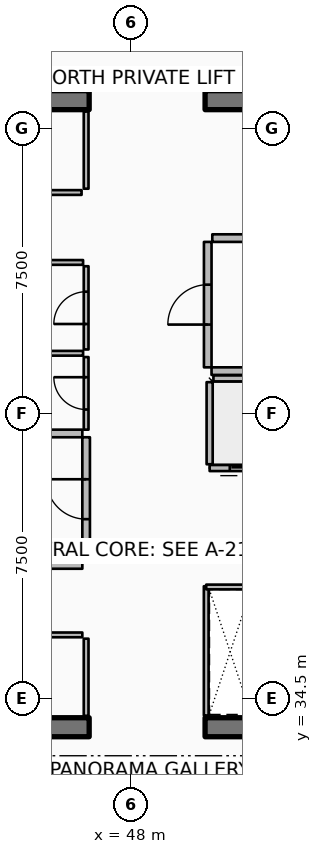
"""IFC4 building model, lengths in metres.
Left out: names, types, materials, properties, quantities, classifications, styles, units other than length and angle.
Written with IfcOpenShell. Run it as: python <this file> out.ifc"""

import sys

from ifc_helpers import new_model, si_unit, direction, frame, frame_2d, origin, place, context, subcontext, project, spatial, rectangle, extrude, element, fill, save


model = new_model("IFC4")
c1 = context("Model", 3, precision=1e-05, world=origin(), true_north=direction((0.0, 1.0)))
c2 = subcontext(c1, "Body", "Model", "MODEL_VIEW")
j1 = project(units=[si_unit("LENGTHUNIT", "METRE"), si_unit("PLANEANGLEUNIT", "RADIAN")], contexts=[c1])
p1 = place(None, origin())
s1 = spatial("IfcSite", under=j1, at=p1, CompositionType="ELEMENT")
p2 = place(p1, origin())
s2 = spatial("IfcBuilding", under=s1, at=p2, CompositionType="ELEMENT")
p3 = place(p2, frame((0.0, 0.0, 347.3)))
s3 = spatial("IfcBuildingStorey", under=s2, at=p3, CompositionType="ELEMENT", Elevation=347.3)
p4 = place(p3, frame((37.3, 33.75, 0.0), z_axis=(0.0, 0.0, 1.0), x_axis=(1.0, 0.0, 0.0)))
e1 = element("IfcWall", 1, at=p4, inside=s3, PredefinedType="SHEAR", context=c2, shape_type="SweptSolid", body=[
    extrude(rectangle(XDim=9.6, YDim=0.5, at=frame_2d((4.8, 0.0))), origin(), (0.0, 0.0, 1.0), 4.2),
])
p5 = place(p3, frame((49.95, 33.75, 0.0), z_axis=(0.0, 0.0, 1.0), x_axis=(1.0, 0.0, 0.0)))
e2 = element("IfcWall", 2, at=p5, inside=s3, PredefinedType="SHEAR", context=c2, shape_type="SweptSolid", body=[
    extrude(rectangle(XDim=9.6, YDim=0.5, at=frame_2d((4.8, 0.0))), origin(), (0.0, 0.0, 1.0), 4.2),
])
p6 = place(p3, frame((37.3, 50.25, 0.0), z_axis=(0.0, 0.0, 1.0), x_axis=(1.0, 0.0, 0.0)))
e3 = element("IfcWall", 3, at=p6, inside=s3, PredefinedType="SHEAR", context=c2, shape_type="SweptSolid", body=[
    extrude(rectangle(XDim=9.6, YDim=0.5, at=frame_2d((4.8, 0.0))), origin(), (0.0, 0.0, 1.0), 4.2),
])
p7 = place(p3, frame((49.95, 50.25, 0.0), z_axis=(0.0, 0.0, 1.0), x_axis=(1.0, 0.0, 0.0)))
e4 = element("IfcWall", 4, at=p7, inside=s3, PredefinedType="SHEAR", context=c2, shape_type="SweptSolid", body=[
    extrude(rectangle(XDim=9.6, YDim=0.5, at=frame_2d((4.8, 0.0))), origin(), (0.0, 0.0, 1.0), 4.2),
])
p8 = place(p3, frame((52.23, 40.57, 0.0), z_axis=(0.0, 0.0, 1.0), x_axis=(-1.0, 0.0, 0.0)))
e5 = element("IfcWall", 5, at=p8, inside=s3, PredefinedType="PARTITIONING", context=c2, shape_type="SweptSolid", body=[
    extrude(rectangle(XDim=2.16, YDim=0.16, at=frame_2d((1.08, 0.0))), origin(), (0.0, 0.0, 1.0), 3.8),
])
p9 = place(p8, frame((0.53, 0.0, 0.0)))
e6 = element("IfcOpeningElement", 6, at=p9, cuts=e5, PredefinedType="OPENING", context=c2, shape_type="SweptSolid", body=[
    extrude(rectangle(XDim=1.1, YDim=2.1, at=frame_2d((0.55, 1.05))), frame((0.0, 0.09, 0.0), z_axis=(0.0, -1.0, 0.0), x_axis=(1.0, 0.0, 0.0)), (0.0, 0.0, 1.0), 0.18),
])
p10 = place(p3, frame((50.07, 40.67, 0.0), z_axis=(0.0, 0.0, 1.0), x_axis=(0.0, 1.0, 0.0)))
e7 = element("IfcWall", 7, at=p10, inside=s3, PredefinedType="PARTITIONING", context=c2, shape_type="SweptSolid", body=[
    extrude(rectangle(XDim=2.16, YDim=0.16, at=frame_2d((1.08, 0.0))), origin(), (0.0, 0.0, 1.0), 3.8),
])
p11 = place(p3, frame((50.17, 42.93, 0.0), z_axis=(0.0, 0.0, 1.0), x_axis=(1.0, 0.0, 0.0)))
e8 = element("IfcWall", 8, at=p11, inside=s3, PredefinedType="PARTITIONING", context=c2, shape_type="SweptSolid", body=[
    extrude(rectangle(XDim=1.96, YDim=0.16, at=frame_2d((0.98, 0.0))), origin(), (0.0, 0.0, 1.0), 3.8),
])
p12 = place(p3, frame((46.82, 34.05, 0.0), z_axis=(0.0, 0.0, 1.0), x_axis=(0.0, 1.0, 0.0)))
e9 = element("IfcWall", 9, at=p12, inside=s3, PredefinedType="PARTITIONING", context=c2, shape_type="SweptSolid", body=[
    extrude(rectangle(XDim=2.03, YDim=0.125, at=frame_2d((1.015, 0.0))), origin(), (0.0, 0.0, 1.0), 3.24),
])
p13 = place(p3, frame((42.6, 36.18, 0.0), z_axis=(0.0, 0.0, 1.0), x_axis=(1.0, 0.0, 0.0)))
e10 = element("IfcWall", 10, at=p13, inside=s3, PredefinedType="PARTITIONING", context=c2, shape_type="SweptSolid", body=[
    extrude(rectangle(XDim=4.12, YDim=0.125, at=frame_2d((2.06, 0.0))), origin(), (0.0, 0.0, 1.0), 3.24),
])
p14 = place(p13, frame((1.635, 0.0, 0.0)))
e11 = element("IfcOpeningElement", 11, at=p14, cuts=e10, PredefinedType="OPENING", context=c2, shape_type="SweptSolid", body=[
    extrude(rectangle(XDim=0.85, YDim=2.06, at=frame_2d((0.425, 1.03))), frame((0.0, 0.073, 0.0), z_axis=(0.0, -1.0, 0.0), x_axis=(1.0, 0.0, 0.0)), (0.0, 0.0, 1.0), 0.145),
])
p15 = place(p3, frame((46.82, 47.92, 0.0), z_axis=(0.0, 0.0, 1.0), x_axis=(0.0, 1.0, 0.0)))
e12 = element("IfcWall", 12, at=p15, inside=s3, PredefinedType="PARTITIONING", context=c2, shape_type="SweptSolid", body=[
    extrude(rectangle(XDim=2.03, YDim=0.125, at=frame_2d((1.015, 0.0))), origin(), (0.0, 0.0, 1.0), 3.24),
])
p16 = place(p3, frame((37.92, 47.82, 0.0), z_axis=(0.0, 0.0, 1.0), x_axis=(1.0, 0.0, 0.0)))
e13 = element("IfcWall", 13, at=p16, inside=s3, PredefinedType="PARTITIONING", context=c2, shape_type="SweptSolid", body=[
    extrude(rectangle(XDim=8.78, YDim=0.125, at=frame_2d((4.39, 0.0))), origin(), (0.0, 0.0, 1.0), 3.24),
])
p17 = place(p16, frame((3.965, 0.0, 0.0)))
e14 = element("IfcOpeningElement", 14, at=p17, cuts=e13, PredefinedType="OPENING", context=c2, shape_type="SweptSolid", body=[
    extrude(rectangle(XDim=0.85, YDim=2.06, at=frame_2d((0.425, 1.03))), frame((0.0, 0.073, 0.0), z_axis=(0.0, -1.0, 0.0), x_axis=(1.0, 0.0, 0.0)), (0.0, 0.0, 1.0), 0.145),
])
p18 = place(p3, frame((41.35, 38.02, 0.0), z_axis=(0.0, 0.0, 1.0), x_axis=(1.0, 0.0, 0.0)))
e15 = element("IfcWall", 15, at=p18, inside=s3, PredefinedType="PARTITIONING", context=c2, shape_type="SweptSolid", body=[
    extrude(rectangle(XDim=5.37, YDim=0.2, at=frame_2d((2.685, 0.0))), origin(), (0.0, 0.0, 1.0), 3.8),
])
p19 = place(p3, frame((43.92, 41.48, 0.0), z_axis=(0.0, 0.0, 1.0), x_axis=(1.0, 0.0, 0.0)))
e16 = element("IfcWall", 16, at=p19, inside=s3, PredefinedType="PARTITIONING", context=c2, shape_type="SweptSolid", body=[
    extrude(rectangle(XDim=2.8, YDim=0.2, at=frame_2d((1.4, 0.0))), origin(), (0.0, 0.0, 1.0), 3.8),
])
p20 = place(p3, frame((46.82, 38.12, 0.0), z_axis=(0.0, 0.0, 1.0), x_axis=(0.0, 1.0, 0.0)))
e17 = element("IfcWall", 17, at=p20, inside=s3, PredefinedType="PARTITIONING", context=c2, shape_type="SweptSolid", body=[
    extrude(rectangle(XDim=3.26, YDim=0.2, at=frame_2d((1.63, 0.0))), origin(), (0.0, 0.0, 1.0), 3.8),
])
p21 = place(p20, frame((1.105, 0.0, 0.0)))
e18 = element("IfcOpeningElement", 18, at=p21, cuts=e17, PredefinedType="OPENING", context=c2, shape_type="SweptSolid", body=[
    extrude(rectangle(XDim=1.05, YDim=2.1, at=frame_2d((0.525, 1.05))), frame((0.0, 0.11, 0.0), z_axis=(0.0, -1.0, 0.0), x_axis=(1.0, 0.0, 0.0)), (0.0, 0.0, 1.0), 0.22),
])
p22 = place(p3, frame((50.12, 43.12, 0.0), z_axis=(0.0, 0.0, 1.0), x_axis=(1.0, 0.0, 0.0)))
e19 = element("IfcWall", 19, at=p22, inside=s3, PredefinedType="PARTITIONING", context=c2, shape_type="SweptSolid", body=[
    extrude(rectangle(XDim=8.88, YDim=0.2, at=frame_2d((4.44, 0.0))), origin(), (0.0, 0.0, 1.0), 3.8),
])
p23 = place(p3, frame((50.14, 46.62, 0.0), z_axis=(0.0, 0.0, 1.0), x_axis=(1.0, 0.0, 0.0)))
e20 = element("IfcWall", 20, at=p23, inside=s3, PredefinedType="PARTITIONING", context=c2, shape_type="SweptSolid", body=[
    extrude(rectangle(XDim=1.02, YDim=0.2, at=frame_2d((0.51, 0.0))), origin(), (0.0, 0.0, 1.0), 3.8),
])
p24 = place(p3, frame((50.02, 43.22, 0.0), z_axis=(0.0, 0.0, 1.0), x_axis=(0.0, 1.0, 0.0)))
e21 = element("IfcWall", 21, at=p24, inside=s3, PredefinedType="PARTITIONING", context=c2, shape_type="SweptSolid", body=[
    extrude(rectangle(XDim=3.3, YDim=0.2, at=frame_2d((1.65, 0.0))), origin(), (0.0, 0.0, 1.0), 3.8),
])
p25 = place(p24, frame((1.125, 0.0, 0.0)))
e22 = element("IfcOpeningElement", 22, at=p25, cuts=e21, PredefinedType="OPENING", context=c2, shape_type="SweptSolid", body=[
    extrude(rectangle(XDim=1.05, YDim=2.1, at=frame_2d((0.525, 1.05))), frame((0.0, 0.11, 0.0), z_axis=(0.0, -1.0, 0.0), x_axis=(1.0, 0.0, 0.0)), (0.0, 0.0, 1.0), 0.22),
])
p26 = place(p3, frame((49.98, 34.06, 0.0), z_axis=(0.0, 0.0, 1.0), x_axis=(0.0, 1.0, 0.0)))
e23 = element("IfcWall", 23, at=p26, inside=s3, PredefinedType="PARTITIONING", context=c2, shape_type="SweptSolid", body=[
    extrude(rectangle(XDim=3.4, YDim=0.125, at=frame_2d((1.7, 0.0))), origin(), (0.0, 0.0, 1.0), 3.24),
])
p27 = place(p3, frame((49.98, 37.44, 0.0), z_axis=(0.0, 0.0, 1.0), x_axis=(1.0, 0.0, 0.0)))
e24 = element("IfcWall", 24, at=p27, inside=s3, PredefinedType="PARTITIONING", context=c2, shape_type="SweptSolid", body=[
    extrude(rectangle(XDim=1.26, YDim=0.125, at=frame_2d((0.63, 0.0))), origin(), (0.0, 0.0, 1.0), 3.24),
])
p28 = place(p3, frame((44.03, 43.59, 0.0), z_axis=(0.0, 0.0, 1.0), x_axis=(1.0, 0.0, 0.0)))
e25 = element("IfcWall", 25, at=p28, inside=s3, PredefinedType="PARTITIONING", context=c2, shape_type="SweptSolid", body=[
    extrude(rectangle(XDim=2.71, YDim=0.125, at=frame_2d((1.355, 0.0))), origin(), (0.0, 0.0, 1.0), 3.24),
])
p29 = place(p3, frame((46.82, 41.58, 0.0), z_axis=(0.0, 0.0, 1.0), x_axis=(0.0, 1.0, 0.0)))
e26 = element("IfcWall", 26, at=p29, inside=s3, PredefinedType="PARTITIONING", context=c2, shape_type="SweptSolid", body=[
    extrude(rectangle(XDim=1.91, YDim=0.125, at=frame_2d((0.955, 0.0))), origin(), (0.0, 0.0, 1.0), 3.24),
])
p30 = place(p29, frame((0.53, 0.0, 0.0)))
e27 = element("IfcOpeningElement", 27, at=p30, cuts=e26, PredefinedType="OPENING", context=c2, shape_type="SweptSolid", body=[
    extrude(rectangle(XDim=0.85, YDim=2.06, at=frame_2d((0.425, 1.03))), frame((0.0, 0.073, 0.0), z_axis=(0.0, -1.0, 0.0), x_axis=(1.0, 0.0, 0.0)), (0.0, 0.0, 1.0), 0.145),
])
p31 = place(p3, frame((46.82, 43.69, 0.0), z_axis=(0.0, 0.0, 1.0), x_axis=(0.0, 1.0, 0.0)))
e28 = element("IfcWall", 28, at=p31, inside=s3, PredefinedType="PARTITIONING", context=c2, shape_type="SweptSolid", body=[
    extrude(rectangle(XDim=2.19, YDim=0.125, at=frame_2d((1.095, 0.0))), origin(), (0.0, 0.0, 1.0), 3.24),
])
p32 = place(p31, frame((0.67, 0.0, 0.0)))
e29 = element("IfcOpeningElement", 29, at=p32, cuts=e28, PredefinedType="OPENING", context=c2, shape_type="SweptSolid", body=[
    extrude(rectangle(XDim=0.85, YDim=2.06, at=frame_2d((0.425, 1.03))), frame((0.0, 0.073, 0.0), z_axis=(0.0, -1.0, 0.0), x_axis=(1.0, 0.0, 0.0)), (0.0, 0.0, 1.0), 0.145),
])
p33 = place(p3, frame((45.48, 45.98, 0.0), z_axis=(0.0, 0.0, 1.0), x_axis=(1.0, 0.0, 0.0)))
e30 = element("IfcWall", 30, at=p33, inside=s3, PredefinedType="PARTITIONING", context=c2, shape_type="SweptSolid", body=[
    extrude(rectangle(XDim=1.26, YDim=0.125, at=frame_2d((0.63, 0.0))), origin(), (0.0, 0.0, 1.0), 3.24),
])
p34 = place(p9, origin())
e31 = element("IfcDoor", 31, at=p34, inside=s3, OperationType="DOUBLE_DOOR_SLIDING", PredefinedType="DOOR", context=c2, shape_type="SweptSolid", body=[
    extrude(rectangle(XDim=1.1, YDim=2.1, at=frame_2d((0.55, 1.05))), frame((0.0, 0.025, 0.0), z_axis=(0.0, -1.0, 0.0), x_axis=(1.0, 0.0, 0.0)), (0.0, 0.0, 1.0), 0.05),
])
fill(e6, e31)
p35 = place(p21, origin())
e32 = element("IfcDoor", 32, at=p35, inside=s3, OperationType="SINGLE_SWING_RIGHT", PredefinedType="DOOR", context=c2, shape_type="SweptSolid", body=[
    extrude(rectangle(XDim=1.05, YDim=2.1, at=frame_2d((0.525, 1.05))), frame((0.0, 0.025, 0.0), z_axis=(0.0, -1.0, 0.0), x_axis=(1.0, 0.0, 0.0)), (0.0, 0.0, 1.0), 0.05),
])
fill(e18, e32)
p36 = place(p25, origin())
e33 = element("IfcDoor", 33, at=p36, inside=s3, OperationType="SINGLE_SWING_LEFT", PredefinedType="DOOR", context=c2, shape_type="SweptSolid", body=[
    extrude(rectangle(XDim=1.05, YDim=2.1, at=frame_2d((0.525, 1.05))), frame((0.0, 0.025, 0.0), z_axis=(0.0, -1.0, 0.0), x_axis=(1.0, 0.0, 0.0)), (0.0, 0.0, 1.0), 0.05),
])
fill(e22, e33)
p37 = place(p30, origin())
e34 = element("IfcDoor", 34, at=p37, inside=s3, OperationType="SINGLE_SWING_RIGHT", PredefinedType="DOOR", context=c2, shape_type="SweptSolid", body=[
    extrude(rectangle(XDim=0.85, YDim=2.06, at=frame_2d((0.425, 1.03))), frame((0.0, 0.025, 0.0), z_axis=(0.0, -1.0, 0.0), x_axis=(1.0, 0.0, 0.0)), (0.0, 0.0, 1.0), 0.05),
])
fill(e27, e34)
p38 = place(p32, origin())
e35 = element("IfcDoor", 35, at=p38, inside=s3, OperationType="SINGLE_SWING_LEFT", PredefinedType="DOOR", context=c2, shape_type="SweptSolid", body=[
    extrude(rectangle(XDim=0.85, YDim=2.06, at=frame_2d((0.425, 1.03))), frame((0.0, 0.025, 0.0), z_axis=(0.0, -1.0, 0.0), x_axis=(1.0, 0.0, 0.0)), (0.0, 0.0, 1.0), 0.05),
])
fill(e29, e35)
save(model, sys.argv[1])
